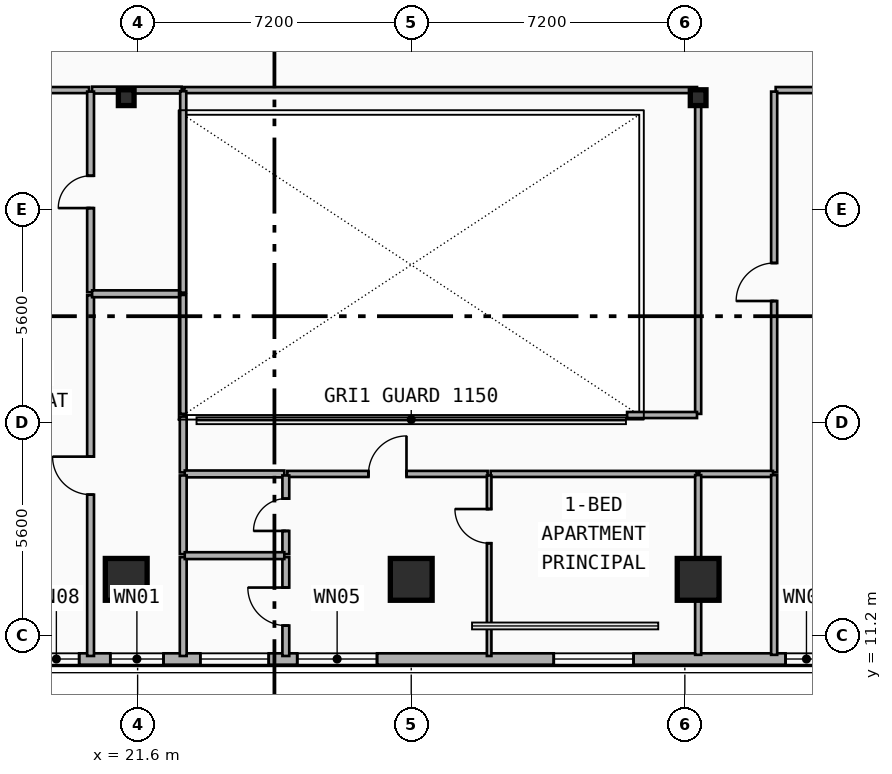
"""IFC4 building model, lengths in metres.
Left out: names, types, materials, properties, quantities, classifications, styles, units other than length and angle.
Written with IfcOpenShell. Run it as: python <this file> out.ifc"""

import sys

from ifc_helpers import new_model, si_unit, direction, frame, frame_2d, origin, origin_2d, place, context, subcontext, project, spatial, rectangle, i_section, extrude, element, fill, save


model = new_model("IFC4")
c1 = context("Model", 3, precision=1e-05, world=origin(), true_north=direction((0.0, 1.0)))
c2 = subcontext(c1, "Body", "Model", "MODEL_VIEW")
j1 = project(units=[si_unit("LENGTHUNIT", "METRE"), si_unit("PLANEANGLEUNIT", "RADIAN")], contexts=[c1])
p1 = place(None, origin())
s1 = spatial("IfcSite", under=j1, at=p1, CompositionType="ELEMENT")
p2 = place(p1, origin())
s2 = spatial("IfcBuilding", under=s1, at=p2, CompositionType="ELEMENT")
p3 = place(p2, frame((0.0, 0.0, 148.35)))
s3 = spatial("IfcBuildingStorey", under=s2, at=p3, CompositionType="ELEMENT", Elevation=148.35)
for number, where, z_axis, x_axis in (
    (1, (21.3, 25.35, 0.0), (0.0, 0.0, 1.0), (1.0, 0.0, 0.0)),
    (2, (36.35, 25.35, 0.0), (0.0, 0.0, 1.0), (1.0, 0.0, 0.0)),
):
    element("IfcColumn", number, at=place(p3, frame(where, z_axis=z_axis, x_axis=x_axis)), inside=s3, PredefinedType="COLUMN", context=c2, shape_type="SweptSolid", body=[
        extrude(i_section(OverallWidth=0.413, OverallDepth=0.415, WebThickness=0.03, FlangeThickness=0.047, FilletRadius=0.015, at=origin_2d()), origin(), (0.0, 0.0, 1.0), 3.55),
    ])
for number, where, z_axis, x_axis in (
    (3, (21.3, 12.784, 0.0), (0.0, -0.09, 0.996), (1.0, 0.0, 0.0)),
    (4, (28.8, 12.784, 0.0), (0.0, -0.09, 0.996), (1.0, 0.0, 0.0)),
    (5, (36.35, 12.784, 0.0), (0.0, -0.09, 0.996), (1.0, 0.0, 0.0)),
):
    element("IfcColumn", number, at=place(p3, frame(where, z_axis=z_axis, x_axis=x_axis)), inside=s3, PredefinedType="COLUMN", context=c2, shape_type="SweptSolid", body=[
        extrude(rectangle(XDim=1.1, YDim=1.1, at=origin_2d()), origin(), (0.0, 0.0, 1.0), 3.564),
    ])
p4 = place(p3, frame((48.0, 10.58, 0.0), z_axis=(0.0, 0.0, 1.0), x_axis=(-1.0, 0.0, 0.0)))
e6 = element("IfcWall", 6, at=p4, inside=s3, PredefinedType="SOLIDWALL", context=c2, shape_type="SweptSolid", body=[
    extrude(rectangle(XDim=38.4, YDim=0.3, at=frame_2d((19.2, 0.0))), origin(), (0.0, 0.0, 1.0), 3.29),
])
p5 = place(p4, frame((36.19, 0.0, 0.34)))
e7 = element("IfcOpeningElement", 7, at=p5, cuts=e6, PredefinedType="OPENING", context=c2, shape_type="SweptSolid", body=[
    extrude(rectangle(XDim=1.8, YDim=1.8, at=frame_2d((0.9, 0.9))), frame((0.0, 0.16, 0.0), z_axis=(0.0, -1.0, 0.0), x_axis=(1.0, 0.0, 0.0)), (0.0, 0.0, 1.0), 0.32),
])
p6 = place(p4, frame((27.938, 0.0, 0.34)))
e8 = element("IfcOpeningElement", 8, at=p6, cuts=e6, PredefinedType="OPENING", context=c2, shape_type="SweptSolid", body=[
    extrude(rectangle(XDim=1.2, YDim=1.5, at=frame_2d((0.6, 0.75))), frame((0.0, 0.16, 0.0), z_axis=(0.0, -1.0, 0.0), x_axis=(1.0, 0.0, 0.0)), (0.0, 0.0, 1.0), 0.32),
])
p7 = place(p4, frame((25.719, 0.0, 0.34)))
e9 = element("IfcOpeningElement", 9, at=p7, cuts=e6, PredefinedType="OPENING", context=c2, shape_type="SweptSolid", body=[
    extrude(rectangle(XDim=1.4, YDim=1.8, at=frame_2d((0.7, 0.9))), frame((0.0, 0.16, 0.0), z_axis=(0.0, -1.0, 0.0), x_axis=(1.0, 0.0, 0.0)), (0.0, 0.0, 1.0), 0.32),
])
p8 = place(p4, frame((33.861, 0.0, 1.22)))
e10 = element("IfcOpeningElement", 10, at=p8, cuts=e6, PredefinedType="OPENING", context=c2, shape_type="SweptSolid", body=[
    extrude(rectangle(XDim=1.2, YDim=1.5, at=frame_2d((0.6, 0.75))), frame((0.0, 0.16, 0.0), z_axis=(0.0, -1.0, 0.0), x_axis=(1.0, 0.0, 0.0)), (0.0, 0.0, 1.0), 0.32),
])
p9 = place(p4, frame((20.1, 0.0, 0.65)))
e11 = element("IfcOpeningElement", 11, at=p9, cuts=e6, PredefinedType="OPENING", context=c2, shape_type="SweptSolid", body=[
    extrude(rectangle(XDim=2.1, YDim=2.1, at=frame_2d((1.05, 1.05))), frame((0.0, 0.16, 0.0), z_axis=(0.0, -1.0, 0.0), x_axis=(1.0, 0.0, 0.0)), (0.0, 0.0, 1.0), 0.32),
])
p10 = place(p4, frame((22.95, 0.0, 0.8)))
e12 = element("IfcOpeningElement", 12, at=p10, cuts=e6, PredefinedType="OPENING", context=c2, shape_type="SweptSolid", body=[
    extrude(rectangle(XDim=1.8, YDim=1.8, at=frame_2d((0.9, 0.9))), frame((0.0, 0.16, 0.0), z_axis=(0.0, -1.0, 0.0), x_axis=(1.0, 0.0, 0.0)), (0.0, 0.0, 1.0), 0.32),
])
p11 = place(p4, frame((13.35, 0.0, 0.65)))
e13 = element("IfcOpeningElement", 13, at=p11, cuts=e6, PredefinedType="OPENING", context=c2, shape_type="SweptSolid", body=[
    extrude(rectangle(XDim=2.1, YDim=2.1, at=frame_2d((1.05, 1.05))), frame((0.0, 0.16, 0.0), z_axis=(0.0, -1.0, 0.0), x_axis=(1.0, 0.0, 0.0)), (0.0, 0.0, 1.0), 0.32),
])
p12 = place(p4, frame((8.25, 0.0, 1.68)))
e14 = element("IfcOpeningElement", 14, at=p12, cuts=e6, PredefinedType="OPENING", context=c2, shape_type="SweptSolid", body=[
    extrude(rectangle(XDim=1.1, YDim=1.05, at=frame_2d((0.55, 0.525))), frame((0.0, 0.16, 0.0), z_axis=(0.0, -1.0, 0.0), x_axis=(1.0, 0.0, 0.0)), (0.0, 0.0, 1.0), 0.32),
])
p13 = place(p4, frame((2.9, 0.0, 0.34)))
e15 = element("IfcOpeningElement", 15, at=p13, cuts=e6, PredefinedType="OPENING", context=c2, shape_type="SweptSolid", body=[
    extrude(rectangle(XDim=1.4, YDim=1.8, at=frame_2d((0.7, 0.9))), frame((0.0, 0.16, 0.0), z_axis=(0.0, -1.0, 0.0), x_axis=(1.0, 0.0, 0.0)), (0.0, 0.0, 1.0), 0.32),
])
p14 = place(p4, frame((0.41, 0.0, 0.34)))
e16 = element("IfcOpeningElement", 16, at=p14, cuts=e6, PredefinedType="OPENING", context=c2, shape_type="SweptSolid", body=[
    extrude(rectangle(XDim=1.8, YDim=1.8, at=frame_2d((0.9, 0.9))), frame((0.0, 0.16, 0.0), z_axis=(0.0, -1.0, 0.0), x_axis=(1.0, 0.0, 0.0)), (0.0, 0.0, 1.0), 0.32),
])
p15 = place(p3, frame((16.48, 25.55, 0.0), z_axis=(0.0, 0.0, 1.0), x_axis=(1.0, 0.0, 0.0)))
e17 = element("IfcWall", 17, at=p15, inside=s3, PredefinedType="PARTITIONING", context=c2, shape_type="SweptSolid", body=[
    extrude(rectangle(XDim=3.842, YDim=0.16, at=frame_2d((1.921, 0.0))), origin(), (0.0, 0.0, 1.0), 3.29),
])
p16 = place(p15, frame((1.421, 0.0, 0.0)))
e18 = element("IfcOpeningElement", 18, at=p16, cuts=e17, PredefinedType="OPENING", context=c2, shape_type="SweptSolid", body=[
    extrude(rectangle(XDim=1.0, YDim=2.15, at=frame_2d((0.5, 1.075))), frame((0.0, 0.09, 0.0), z_axis=(0.0, -1.0, 0.0), x_axis=(1.0, 0.0, 0.0)), (0.0, 0.0, 1.0), 0.18),
])
p17 = place(p3, frame((20.402, 25.55, 0.0), z_axis=(0.0, 0.0, 1.0), x_axis=(1.0, 0.0, 0.0)))
e19 = element("IfcWall", 19, at=p17, inside=s3, PredefinedType="PLUMBINGWALL", context=c2, shape_type="SweptSolid", body=[
    extrude(rectangle(XDim=2.358, YDim=0.18, at=frame_2d((1.179, 0.0))), origin(), (0.0, 0.0, 1.0), 2.36),
])
p18 = place(p3, frame((38.39, 25.55, 0.0), z_axis=(0.0, 0.0, 1.0), x_axis=(1.0, 0.0, 0.0)))
e20 = element("IfcWall", 20, at=p18, inside=s3, PredefinedType="PARTITIONING", context=c2, shape_type="SweptSolid", body=[
    extrude(rectangle(XDim=3.233, YDim=0.16, at=frame_2d((1.617, 0.0))), origin(), (0.0, 0.0, 1.0), 3.29),
])
p19 = place(p18, frame((1.116, 0.0, 0.0)))
e21 = element("IfcOpeningElement", 21, at=p19, cuts=e20, PredefinedType="OPENING", context=c2, shape_type="SweptSolid", body=[
    extrude(rectangle(XDim=1.0, YDim=2.15, at=frame_2d((0.5, 1.075))), frame((0.0, 0.09, 0.0), z_axis=(0.0, -1.0, 0.0), x_axis=(1.0, 0.0, 0.0)), (0.0, 0.0, 1.0), 0.18),
])
p20 = place(p3, frame((38.35, 15.49, 0.0), z_axis=(0.0, 0.0, 1.0), x_axis=(0.0, 1.0, 0.0)))
e22 = element("IfcWall", 22, at=p20, inside=s3, PredefinedType="PARTITIONING", context=c2, shape_type="SweptSolid", body=[
    extrude(rectangle(XDim=10.02, YDim=0.16, at=frame_2d((5.01, 0.0))), origin(), (0.0, 0.0, 1.0), 2.72),
])
p21 = place(p20, frame((4.51, 0.0, 0.0)))
e23 = element("IfcOpeningElement", 23, at=p21, cuts=e22, PredefinedType="OPENING", context=c2, shape_type="SweptSolid", body=[
    extrude(rectangle(XDim=1.0, YDim=2.15, at=frame_2d((0.5, 1.075))), frame((0.0, 0.09, 0.0), z_axis=(0.0, -1.0, 0.0), x_axis=(1.0, 0.0, 0.0)), (0.0, 0.0, 1.0), 0.18),
])
p22 = place(p3, frame((22.8, 15.49, 0.0), z_axis=(0.0, 0.0, 1.0), x_axis=(0.0, 1.0, 0.0)))
e24 = element("IfcWall", 24, at=p22, inside=s3, PredefinedType="PLUMBINGWALL", context=c2, shape_type="SweptSolid", body=[
    extrude(rectangle(XDim=1.47, YDim=0.18, at=frame_2d((0.735, 0.0))), origin(), (0.0, 0.0, 1.0), 2.73),
])
p23 = place(p3, frame((25.54, 15.45, 0.0), z_axis=(0.0, 0.0, 1.0), x_axis=(1.0, 0.0, 0.0)))
e25 = element("IfcWall", 25, at=p23, inside=s3, PredefinedType="PARTITIONING", context=c2, shape_type="SweptSolid", body=[
    extrude(rectangle(XDim=5.27, YDim=0.16, at=frame_2d((2.635, 0.0))), origin(), (0.0, 0.0, 1.0), 2.36),
])
p24 = place(p23, frame((2.135, 0.0, 0.0)))
e26 = element("IfcOpeningElement", 26, at=p24, cuts=e25, PredefinedType="OPENING", context=c2, shape_type="SweptSolid", body=[
    extrude(rectangle(XDim=1.0, YDim=2.15, at=frame_2d((0.5, 1.075))), frame((0.0, 0.09, 0.0), z_axis=(0.0, -1.0, 0.0), x_axis=(1.0, 0.0, 0.0)), (0.0, 0.0, 1.0), 0.18),
])
p25 = place(p3, frame((22.84, 15.45, 0.0), z_axis=(0.0, 0.0, 1.0), x_axis=(1.0, 0.0, 0.0)))
e27 = element("IfcWall", 27, at=p25, inside=s3, PredefinedType="PLUMBINGWALL", context=c2, shape_type="SweptSolid", body=[
    extrude(rectangle(XDim=2.62, YDim=0.18, at=frame_2d((1.31, 0.0))), origin(), (0.0, 0.0, 1.0), 3.29),
])
p26 = place(p3, frame((30.89, 15.45, 0.0), z_axis=(0.0, 0.0, 1.0), x_axis=(1.0, 0.0, 0.0)))
e28 = element("IfcWall", 28, at=p26, inside=s3, PredefinedType="PARTITIONING", context=c2, shape_type="SweptSolid", body=[
    extrude(rectangle(XDim=5.42, YDim=0.16, at=frame_2d((2.71, 0.0))), origin(), (0.0, 0.0, 1.0), 2.36),
])
p27 = place(p3, frame((20.362, 10.66, 0.0), z_axis=(0.0, 0.0, 1.0), x_axis=(0.0, 1.0, 0.0)))
e29 = element("IfcWall", 29, at=p27, inside=s3, PredefinedType="PLUMBINGWALL", context=c2, shape_type="SweptSolid", body=[
    extrude(rectangle(XDim=9.49, YDim=0.18, at=frame_2d((4.745, 0.0))), origin(), (0.0, 0.0, 1.0), 2.72),
])
p28 = place(p27, frame((4.245, 0.0, 0.0)))
e30 = element("IfcOpeningElement", 30, at=p28, cuts=e29, PredefinedType="OPENING", context=c2, shape_type="SweptSolid", body=[
    extrude(rectangle(XDim=1.0, YDim=2.15, at=frame_2d((0.5, 1.075))), frame((0.0, 0.1, 0.0), z_axis=(0.0, -1.0, 0.0), x_axis=(1.0, 0.0, 0.0)), (0.0, 0.0, 1.0), 0.2),
])
p29 = place(p3, frame((20.362, 20.23, 0.0), z_axis=(0.0, 0.0, 1.0), x_axis=(0.0, 1.0, 0.0)))
e31 = element("IfcWall", 31, at=p29, inside=s3, PredefinedType="PLUMBINGWALL", context=c2, shape_type="SweptSolid", body=[
    extrude(rectangle(XDim=5.28, YDim=0.18, at=frame_2d((2.64, 0.0))), origin(), (0.0, 0.0, 1.0), 2.72),
])
p30 = place(p29, frame((2.215, 0.0, 0.0)))
e32 = element("IfcOpeningElement", 32, at=p30, cuts=e31, PredefinedType="OPENING", context=c2, shape_type="SweptSolid", body=[
    extrude(rectangle(XDim=0.85, YDim=2.1, at=frame_2d((0.425, 1.05))), frame((0.0, 0.1, 0.0), z_axis=(0.0, -1.0, 0.0), x_axis=(1.0, 0.0, 0.0)), (0.0, 0.0, 1.0), 0.2),
])
p31 = place(p3, frame((20.402, 20.19, 0.0), z_axis=(0.0, 0.0, 1.0), x_axis=(1.0, 0.0, 0.0)))
e33 = element("IfcWall", 33, at=p31, inside=s3, PredefinedType="PLUMBINGWALL", context=c2, shape_type="SweptSolid", body=[
    extrude(rectangle(XDim=2.358, YDim=0.18, at=frame_2d((1.179, 0.0))), origin(), (0.0, 0.0, 1.0), 2.36),
])
p32 = place(p3, frame((22.8, 10.66, 0.0), z_axis=(0.0, 0.0, 1.0), x_axis=(0.0, 1.0, 0.0)))
e34 = element("IfcWall", 34, at=p32, inside=s3, PredefinedType="PLUMBINGWALL", context=c2, shape_type="SweptSolid", body=[
    extrude(rectangle(XDim=2.6, YDim=0.18, at=frame_2d((1.3, 0.0))), origin(), (0.0, 0.0, 1.0), 2.91),
])
p33 = place(p3, frame((22.8, 13.34, 0.0), z_axis=(0.0, 0.0, 1.0), x_axis=(0.0, 1.0, 0.0)))
e35 = element("IfcWall", 35, at=p33, inside=s3, PredefinedType="PLUMBINGWALL", context=c2, shape_type="SweptSolid", body=[
    extrude(rectangle(XDim=2.07, YDim=0.18, at=frame_2d((1.035, 0.0))), origin(), (0.0, 0.0, 1.0), 3.29),
])
p34 = place(p3, frame((25.5, 10.66, 0.0), z_axis=(0.0, 0.0, 1.0), x_axis=(0.0, 1.0, 0.0)))
e36 = element("IfcWall", 36, at=p34, inside=s3, PredefinedType="PLUMBINGWALL", context=c2, shape_type="SweptSolid", body=[
    extrude(rectangle(XDim=2.6, YDim=0.18, at=frame_2d((1.3, 0.0))), origin(), (0.0, 0.0, 1.0), 2.91),
])
p35 = place(p34, frame((0.8, 0.0, 0.0)))
e37 = element("IfcOpeningElement", 37, at=p35, cuts=e36, PredefinedType="OPENING", context=c2, shape_type="SweptSolid", body=[
    extrude(rectangle(XDim=1.0, YDim=2.15, at=frame_2d((0.5, 1.075))), frame((0.0, 0.1, 0.0), z_axis=(0.0, -1.0, 0.0), x_axis=(1.0, 0.0, 0.0)), (0.0, 0.0, 1.0), 0.2),
])
p36 = place(p3, frame((25.5, 13.34, 0.0), z_axis=(0.0, 0.0, 1.0), x_axis=(0.0, 1.0, 0.0)))
e38 = element("IfcWall", 38, at=p36, inside=s3, PredefinedType="PLUMBINGWALL", context=c2, shape_type="SweptSolid", body=[
    extrude(rectangle(XDim=2.07, YDim=0.18, at=frame_2d((1.035, 0.0))), origin(), (0.0, 0.0, 1.0), 3.29),
])
p37 = place(p36, frame((0.61, 0.0, 0.0)))
e39 = element("IfcOpeningElement", 39, at=p37, cuts=e38, PredefinedType="OPENING", context=c2, shape_type="SweptSolid", body=[
    extrude(rectangle(XDim=0.85, YDim=2.1, at=frame_2d((0.425, 1.05))), frame((0.0, 0.1, 0.0), z_axis=(0.0, -1.0, 0.0), x_axis=(1.0, 0.0, 0.0)), (0.0, 0.0, 1.0), 0.2),
])
p38 = place(p3, frame((30.85, 10.66, 0.0), z_axis=(0.0, 0.0, 1.0), x_axis=(0.0, 1.0, 0.0)))
e40 = element("IfcWall", 40, at=p38, inside=s3, PredefinedType="PARTITIONING", context=c2, shape_type="SweptSolid", body=[
    extrude(rectangle(XDim=4.75, YDim=0.12, at=frame_2d((2.375, 0.0))), origin(), (0.0, 0.0, 1.0), 2.91),
])
p39 = place(p38, frame((2.966, 0.0, 0.0)))
e41 = element("IfcOpeningElement", 41, at=p39, cuts=e40, PredefinedType="OPENING", context=c2, shape_type="SweptSolid", body=[
    extrude(rectangle(XDim=0.9, YDim=2.1, at=frame_2d((0.45, 1.05))), frame((0.0, 0.07, 0.0), z_axis=(0.0, -1.0, 0.0), x_axis=(1.0, 0.0, 0.0)), (0.0, 0.0, 1.0), 0.14),
])
p40 = place(p3, frame((22.84, 13.3, 0.0), z_axis=(0.0, 0.0, 1.0), x_axis=(1.0, 0.0, 0.0)))
e42 = element("IfcWall", 42, at=p40, inside=s3, PredefinedType="PLUMBINGWALL", context=c2, shape_type="SweptSolid", body=[
    extrude(rectangle(XDim=2.62, YDim=0.18, at=frame_2d((1.31, 0.0))), origin(), (0.0, 0.0, 1.0), 3.29),
])
p41 = place(p3, frame((22.83, 25.55, 0.0), z_axis=(0.0, 0.0, 1.0), x_axis=(1.0, 0.0, 0.0)))
e43 = element("IfcWall", 43, at=p41, inside=s3, PredefinedType="PARTITIONING", context=c2, shape_type="SweptSolid", body=[
    extrude(rectangle(XDim=13.49, YDim=0.16, at=frame_2d((6.745, 0.0))), origin(), (0.0, 0.0, 1.0), 2.36),
])
p42 = place(p3, frame((36.38, 15.45, 0.0), z_axis=(0.0, 0.0, 1.0), x_axis=(1.0, 0.0, 0.0)))
e44 = element("IfcWall", 44, at=p42, inside=s3, PredefinedType="PARTITIONING", context=c2, shape_type="SweptSolid", body=[
    extrude(rectangle(XDim=1.94, YDim=0.16, at=frame_2d((0.97, 0.0))), origin(), (0.0, 0.0, 1.0), 2.36),
])
p43 = place(p3, frame((36.35, 17.03, 0.0), z_axis=(0.0, 0.0, 1.0), x_axis=(0.0, 1.0, 0.0)))
e45 = element("IfcWall", 45, at=p43, inside=s3, PredefinedType="PARTITIONING", context=c2, shape_type="SweptSolid", body=[
    extrude(rectangle(XDim=8.49, YDim=0.16, at=frame_2d((4.245, 0.0))), origin(), (0.0, 0.0, 1.0), 2.36),
])
p44 = place(p3, frame((34.48, 17.0, 0.0), z_axis=(0.0, 0.0, 1.0), x_axis=(1.0, 0.0, 0.0)))
e46 = element("IfcWall", 46, at=p44, inside=s3, PredefinedType="PARTITIONING", context=c2, shape_type="SweptSolid", body=[
    extrude(rectangle(XDim=1.84, YDim=0.16, at=frame_2d((0.92, 0.0))), origin(), (0.0, 0.0, 1.0), 2.36),
])
p45 = place(p3, frame((22.8, 17.03, 0.0), z_axis=(0.0, 0.0, 1.0), x_axis=(0.0, 1.0, 0.0)))
e47 = element("IfcWall", 47, at=p45, inside=s3, PredefinedType="PARTITIONING", context=c2, shape_type="SweptSolid", body=[
    extrude(rectangle(XDim=3.13, YDim=0.16, at=frame_2d((1.565, 0.0))), origin(), (0.0, 0.0, 1.0), 2.73),
])
p46 = place(p3, frame((22.8, 20.22, 0.0), z_axis=(0.0, 0.0, 1.0), x_axis=(0.0, 1.0, 0.0)))
e48 = element("IfcWall", 48, at=p46, inside=s3, PredefinedType="PARTITIONING", context=c2, shape_type="SweptSolid", body=[
    extrude(rectangle(XDim=5.3, YDim=0.16, at=frame_2d((2.65, 0.0))), origin(), (0.0, 0.0, 1.0), 3.29),
])
p47 = place(p3, frame((36.35, 10.69, 0.0), z_axis=(0.0, 0.0, 1.0), x_axis=(0.0, 1.0, 0.0)))
e49 = element("IfcWall", 49, at=p47, inside=s3, PredefinedType="PARTITIONING", context=c2, shape_type="SweptSolid", body=[
    extrude(rectangle(XDim=4.73, YDim=0.16, at=frame_2d((2.365, 0.0))), origin(), (0.0, 0.0, 1.0), 2.36),
])
p48 = place(p3, frame((38.35, 10.69, 0.0), z_axis=(0.0, 0.0, 1.0), x_axis=(0.0, 1.0, 0.0)))
e50 = element("IfcWall", 50, at=p48, inside=s3, PredefinedType="PARTITIONING", context=c2, shape_type="SweptSolid", body=[
    extrude(rectangle(XDim=4.73, YDim=0.16, at=frame_2d((2.365, 0.0))), origin(), (0.0, 0.0, 1.0), 2.91),
])
p49 = place(p6, origin())
e51 = element("IfcWindow", 51, at=p49, inside=s3, PartitioningType="SINGLE_PANEL", PredefinedType="WINDOW", context=c2, shape_type="SweptSolid", body=[
    extrude(rectangle(XDim=1.2, YDim=1.5, at=frame_2d((0.6, 0.75))), frame((0.0, 0.03, 0.0), z_axis=(0.0, -1.0, 0.0), x_axis=(1.0, 0.0, 0.0)), (0.0, 0.0, 1.0), 0.06),
])
fill(e8, e51)
p50 = place(p7, origin())
e52 = element("IfcWindow", 52, at=p50, inside=s3, PartitioningType="SINGLE_PANEL", PredefinedType="WINDOW", context=c2, shape_type="SweptSolid", body=[
    extrude(rectangle(XDim=1.4, YDim=1.8, at=frame_2d((0.7, 0.9))), frame((0.0, 0.03, 0.0), z_axis=(0.0, -1.0, 0.0), x_axis=(1.0, 0.0, 0.0)), (0.0, 0.0, 1.0), 0.06),
])
fill(e9, e52)
p51 = place(p9, origin())
e53 = element("IfcWindow", 53, at=p51, inside=s3, PartitioningType="SINGLE_PANEL", PredefinedType="WINDOW", context=c2, shape_type="SweptSolid", body=[
    extrude(rectangle(XDim=2.1, YDim=2.1, at=frame_2d((1.05, 1.05))), frame((0.0, 0.03, 0.0), z_axis=(0.0, -1.0, 0.0), x_axis=(1.0, 0.0, 0.0)), (0.0, 0.0, 1.0), 0.06),
])
fill(e11, e53)
p52 = place(p10, origin())
e54 = element("IfcWindow", 54, at=p52, inside=s3, PartitioningType="SINGLE_PANEL", PredefinedType="WINDOW", context=c2, shape_type="SweptSolid", body=[
    extrude(rectangle(XDim=1.8, YDim=1.8, at=frame_2d((0.9, 0.9))), frame((0.0, 0.03, 0.0), z_axis=(0.0, -1.0, 0.0), x_axis=(1.0, 0.0, 0.0)), (0.0, 0.0, 1.0), 0.06),
])
fill(e12, e54)
p53 = place(p11, origin())
e55 = element("IfcWindow", 55, at=p53, inside=s3, PartitioningType="SINGLE_PANEL", PredefinedType="WINDOW", context=c2, shape_type="SweptSolid", body=[
    extrude(rectangle(XDim=2.1, YDim=2.1, at=frame_2d((1.05, 1.05))), frame((0.0, 0.03, 0.0), z_axis=(0.0, -1.0, 0.0), x_axis=(1.0, 0.0, 0.0)), (0.0, 0.0, 1.0), 0.06),
])
fill(e13, e55)
p54 = place(p12, origin())
e56 = element("IfcWindow", 56, at=p54, inside=s3, PartitioningType="SINGLE_PANEL", PredefinedType="WINDOW", context=c2, shape_type="SweptSolid", body=[
    extrude(rectangle(XDim=1.1, YDim=1.05, at=frame_2d((0.55, 0.525))), frame((0.0, 0.03, 0.0), z_axis=(0.0, -1.0, 0.0), x_axis=(1.0, 0.0, 0.0)), (0.0, 0.0, 1.0), 0.06),
])
fill(e14, e56)
p55 = place(p21, origin())
e57 = element("IfcDoor", 57, at=p55, inside=s3, OperationType="SINGLE_SWING_LEFT", PredefinedType="DOOR", context=c2, shape_type="SweptSolid", body=[
    extrude(rectangle(XDim=1.0, YDim=2.15, at=frame_2d((0.5, 1.075))), frame((0.0, 0.025, 0.0), z_axis=(0.0, -1.0, 0.0), x_axis=(1.0, 0.0, 0.0)), (0.0, 0.0, 1.0), 0.05),
])
fill(e23, e57)
p56 = place(p24, origin())
e58 = element("IfcDoor", 58, at=p56, inside=s3, OperationType="SINGLE_SWING_RIGHT", PredefinedType="DOOR", context=c2, shape_type="SweptSolid", body=[
    extrude(rectangle(XDim=1.0, YDim=2.15, at=frame_2d((0.5, 1.075))), frame((0.0, 0.025, 0.0), z_axis=(0.0, -1.0, 0.0), x_axis=(1.0, 0.0, 0.0)), (0.0, 0.0, 1.0), 0.05),
])
fill(e26, e58)
p57 = place(p28, origin())
e59 = element("IfcDoor", 59, at=p57, inside=s3, OperationType="SINGLE_SWING_RIGHT", PredefinedType="DOOR", context=c2, shape_type="SweptSolid", body=[
    extrude(rectangle(XDim=1.0, YDim=2.15, at=frame_2d((0.5, 1.075))), frame((0.0, 0.025, 0.0), z_axis=(0.0, -1.0, 0.0), x_axis=(1.0, 0.0, 0.0)), (0.0, 0.0, 1.0), 0.05),
])
fill(e30, e59)
p58 = place(p30, origin())
e60 = element("IfcDoor", 60, at=p58, inside=s3, OperationType="SINGLE_SWING_LEFT", PredefinedType="DOOR", context=c2, shape_type="SweptSolid", body=[
    extrude(rectangle(XDim=0.85, YDim=2.1, at=frame_2d((0.425, 1.05))), frame((0.0, 0.025, 0.0), z_axis=(0.0, -1.0, 0.0), x_axis=(1.0, 0.0, 0.0)), (0.0, 0.0, 1.0), 0.05),
])
fill(e32, e60)
p59 = place(p35, origin())
e61 = element("IfcDoor", 61, at=p59, inside=s3, OperationType="SINGLE_SWING_RIGHT", PredefinedType="DOOR", context=c2, shape_type="SweptSolid", body=[
    extrude(rectangle(XDim=1.0, YDim=2.15, at=frame_2d((0.5, 1.075))), frame((0.0, 0.025, 0.0), z_axis=(0.0, -1.0, 0.0), x_axis=(1.0, 0.0, 0.0)), (0.0, 0.0, 1.0), 0.05),
])
fill(e37, e61)
p60 = place(p37, origin())
e62 = element("IfcDoor", 62, at=p60, inside=s3, OperationType="SINGLE_SWING_LEFT", PredefinedType="DOOR", context=c2, shape_type="SweptSolid", body=[
    extrude(rectangle(XDim=0.85, YDim=2.1, at=frame_2d((0.425, 1.05))), frame((0.0, 0.025, 0.0), z_axis=(0.0, -1.0, 0.0), x_axis=(1.0, 0.0, 0.0)), (0.0, 0.0, 1.0), 0.05),
])
fill(e39, e62)
p61 = place(p39, origin())
e63 = element("IfcDoor", 63, at=p61, inside=s3, OperationType="SINGLE_SWING_RIGHT", PredefinedType="DOOR", context=c2, shape_type="SweptSolid", body=[
    extrude(rectangle(XDim=0.9, YDim=2.1, at=frame_2d((0.45, 1.05))), frame((0.0, 0.025, 0.0), z_axis=(0.0, -1.0, 0.0), x_axis=(1.0, 0.0, 0.0)), (0.0, 0.0, 1.0), 0.05),
])
fill(e41, e63)
save(model, sys.argv[1])
